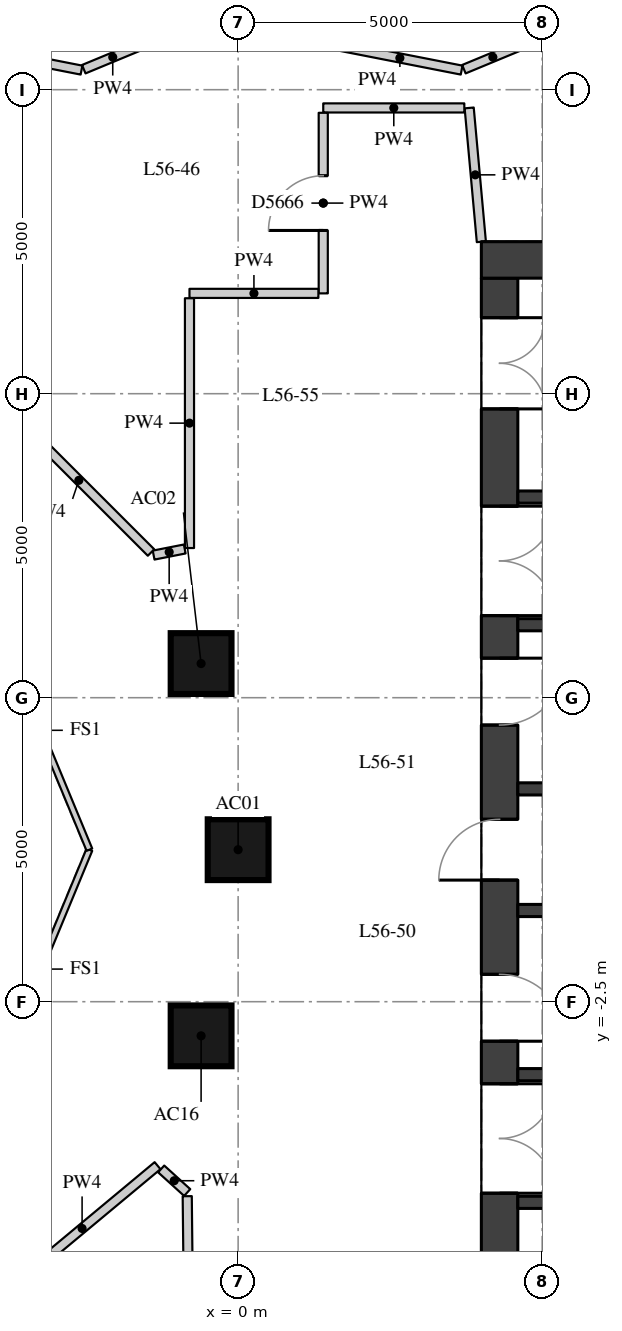
"""IFC4 building model, lengths in metres.
Left out: names, types, materials, properties, quantities, classifications, styles, units other than length and angle.
Written with IfcOpenShell. Run it as: python <this file> out.ifc"""

import sys

from ifc_helpers import new_model, si_unit, direction, frame, frame_2d, origin, origin_2d, place, context, subcontext, project, spatial, rectangle, extrude, element, fill, save


model = new_model("IFC4")
c1 = context("Model", 3, precision=1e-05, world=origin(), true_north=direction((0.0, 1.0)))
c2 = subcontext(c1, "Body", "Model", "MODEL_VIEW")
j1 = project(units=[si_unit("LENGTHUNIT", "METRE"), si_unit("PLANEANGLEUNIT", "RADIAN")], contexts=[c1])
p1 = place(None, origin())
s1 = spatial("IfcSite", under=j1, at=p1, CompositionType="ELEMENT")
p2 = place(p1, origin())
s2 = spatial("IfcBuilding", under=s1, at=p2, CompositionType="ELEMENT")
p3 = place(p2, frame((0.0, 0.0, 199.1)))
s3 = spatial("IfcBuildingStorey", under=s2, at=p3, CompositionType="ELEMENT", Elevation=199.1)
for number, where, z_axis, x_axis in (
    (1, (0.0, 0.0, 0.0), (0.0, 0.0, 1.0), (1.0, 0.0, 0.0)),
    (2, (-0.609, 3.062, 0.0), (0.0, 0.0, 1.0), (1.0, 0.0, 0.0)),
    (3, (-0.609, -3.062, 0.0), (0.0, 0.0, 1.0), (1.0, 0.0, 0.0)),
):
    element("IfcColumn", number, at=place(p3, frame(where, z_axis=z_axis, x_axis=x_axis)), inside=s3, PredefinedType="COLUMN", context=c2, shape_type="SweptSolid", body=[
        extrude(rectangle(XDim=1.0, YDim=1.0, at=origin_2d()), origin(), (0.0, 0.0, 1.0), 3.3),
    ])
p4 = place(p3, frame((4.3, -9.4, 0.0), z_axis=(0.0, 0.0, 1.0), x_axis=(0.0, 1.0, 0.0)))
e4 = element("IfcWall", 4, at=p4, inside=s3, PredefinedType="SHEAR", context=c2, shape_type="SweptSolid", body=[
    extrude(rectangle(XDim=18.8, YDim=0.6, at=frame_2d((9.4, 0.0))), origin(), (0.0, 0.0, 1.0), 3.02),
])
p5 = place(p4, frame((0.65, 0.0, 0.0)))
e5 = element("IfcOpeningElement", 5, at=p5, cuts=e4, PredefinedType="OPENING", context=c2, shape_type="SweptSolid", body=[
    extrude(rectangle(XDim=1.5, YDim=2.1, at=frame_2d((0.75, 1.05))), frame((0.0, 0.31, 0.0), z_axis=(0.0, -1.0, 0.0), x_axis=(1.0, 0.0, 0.0)), (0.0, 0.0, 1.0), 0.62),
])
p6 = place(p4, frame((3.75, 0.0, 0.0)))
e6 = element("IfcOpeningElement", 6, at=p6, cuts=e4, PredefinedType="OPENING", context=c2, shape_type="SweptSolid", body=[
    extrude(rectangle(XDim=1.8, YDim=2.1, at=frame_2d((0.9, 1.05))), frame((0.0, 0.31, 0.0), z_axis=(0.0, -1.0, 0.0), x_axis=(1.0, 0.0, 0.0)), (0.0, 0.0, 1.0), 0.62),
])
p7 = place(p4, frame((6.25, 0.0, 0.0)))
e7 = element("IfcOpeningElement", 7, at=p7, cuts=e4, PredefinedType="OPENING", context=c2, shape_type="SweptSolid", body=[
    extrude(rectangle(XDim=1.1, YDim=2.1, at=frame_2d((0.55, 1.05))), frame((0.0, 0.31, 0.0), z_axis=(0.0, -1.0, 0.0), x_axis=(1.0, 0.0, 0.0)), (0.0, 0.0, 1.0), 0.62),
])
p8 = place(p4, frame((8.9, 0.0, 0.0)))
e8 = element("IfcOpeningElement", 8, at=p8, cuts=e4, PredefinedType="OPENING", context=c2, shape_type="SweptSolid", body=[
    extrude(rectangle(XDim=1.0, YDim=2.1, at=frame_2d((0.5, 1.05))), frame((0.0, 0.31, 0.0), z_axis=(0.0, -1.0, 0.0), x_axis=(1.0, 0.0, 0.0)), (0.0, 0.0, 1.0), 0.62),
])
p9 = place(p4, frame((11.45, 0.0, 0.0)))
e9 = element("IfcOpeningElement", 9, at=p9, cuts=e4, PredefinedType="OPENING", context=c2, shape_type="SweptSolid", body=[
    extrude(rectangle(XDim=1.1, YDim=2.1, at=frame_2d((0.55, 1.05))), frame((0.0, 0.31, 0.0), z_axis=(0.0, -1.0, 0.0), x_axis=(1.0, 0.0, 0.0)), (0.0, 0.0, 1.0), 0.62),
])
p10 = place(p4, frame((13.25, 0.0, 0.0)))
e10 = element("IfcOpeningElement", 10, at=p10, cuts=e4, PredefinedType="OPENING", context=c2, shape_type="SweptSolid", body=[
    extrude(rectangle(XDim=1.8, YDim=2.1, at=frame_2d((0.9, 1.05))), frame((0.0, 0.31, 0.0), z_axis=(0.0, -1.0, 0.0), x_axis=(1.0, 0.0, 0.0)), (0.0, 0.0, 1.0), 0.62),
])
p11 = place(p4, frame((16.65, 0.0, 0.0)))
e11 = element("IfcOpeningElement", 11, at=p11, cuts=e4, PredefinedType="OPENING", context=c2, shape_type="SweptSolid", body=[
    extrude(rectangle(XDim=1.5, YDim=2.1, at=frame_2d((0.75, 1.05))), frame((0.0, 0.31, 0.0), z_axis=(0.0, -1.0, 0.0), x_axis=(1.0, 0.0, 0.0)), (0.0, 0.0, 1.0), 0.62),
])
p12 = place(p3, frame((4.0, 9.7, 0.0), z_axis=(0.0, 0.0, 1.0), x_axis=(1.0, 0.0, 0.0)))
e12 = element("IfcWall", 12, at=p12, inside=s3, PredefinedType="SHEAR", context=c2, shape_type="SweptSolid", body=[
    extrude(rectangle(XDim=12.0, YDim=0.6, at=frame_2d((6.0, 0.0))), origin(), (0.0, 0.0, 1.0), 3.02),
])
p13 = place(p3, frame((4.6, 5.8, 0.0), z_axis=(0.0, 0.0, 1.0), x_axis=(1.0, 0.0, 0.0)))
e13 = element("IfcWall", 13, at=p13, inside=s3, PredefinedType="SHEAR", context=c2, shape_type="SweptSolid", body=[
    extrude(rectangle(XDim=10.8, YDim=0.2, at=frame_2d((5.4, 0.0))), origin(), (0.0, 0.0, 1.0), 3.02),
])
p14 = place(p13, frame((7.05, 0.0, 0.0)))
e14 = element("IfcOpeningElement", 14, at=p14, cuts=e13, PredefinedType="OPENING", context=c2, shape_type="SweptSolid", body=[
    extrude(rectangle(XDim=1.1, YDim=2.1, at=frame_2d((0.55, 1.05))), frame((0.0, 0.11, 0.0), z_axis=(0.0, -1.0, 0.0), x_axis=(1.0, 0.0, 0.0)), (0.0, 0.0, 1.0), 0.22),
])
p15 = place(p13, frame((9.05, 0.0, 0.0)))
e15 = element("IfcOpeningElement", 15, at=p15, cuts=e13, PredefinedType="OPENING", context=c2, shape_type="SweptSolid", body=[
    extrude(rectangle(XDim=1.1, YDim=2.1, at=frame_2d((0.55, 1.05))), frame((0.0, 0.11, 0.0), z_axis=(0.0, -1.0, 0.0), x_axis=(1.0, 0.0, 0.0)), (0.0, 0.0, 1.0), 0.22),
])
p16 = place(p3, frame((4.6, 3.7, 0.0), z_axis=(0.0, 0.0, 1.0), x_axis=(1.0, 0.0, 0.0)))
e16 = element("IfcWall", 16, at=p16, inside=s3, PredefinedType="SHEAR", context=c2, shape_type="SweptSolid", body=[
    extrude(rectangle(XDim=10.8, YDim=0.2, at=frame_2d((5.4, 0.0))), origin(), (0.0, 0.0, 1.0), 3.02),
])
p17 = place(p16, frame((6.6, 0.0, 0.0)))
e17 = element("IfcOpeningElement", 17, at=p17, cuts=e16, PredefinedType="OPENING", context=c2, shape_type="SweptSolid", body=[
    extrude(rectangle(XDim=1.1, YDim=2.1, at=frame_2d((0.55, 1.05))), frame((0.0, 0.11, 0.0), z_axis=(0.0, -1.0, 0.0), x_axis=(1.0, 0.0, 0.0)), (0.0, 0.0, 1.0), 0.22),
])
p18 = place(p16, frame((8.9, 0.0, 0.0)))
e18 = element("IfcOpeningElement", 18, at=p18, cuts=e16, PredefinedType="OPENING", context=c2, shape_type="SweptSolid", body=[
    extrude(rectangle(XDim=1.1, YDim=2.1, at=frame_2d((0.55, 1.05))), frame((0.0, 0.11, 0.0), z_axis=(0.0, -1.0, 0.0), x_axis=(1.0, 0.0, 0.0)), (0.0, 0.0, 1.0), 0.22),
])
for number, where, z_axis, x_axis in (
    (19, (4.6, 1.0, 0.0), (0.0, 0.0, 1.0), (1.0, 0.0, 0.0)),
    (20, (4.6, -1.0, 0.0), (0.0, 0.0, 1.0), (1.0, 0.0, 0.0)),
):
    element("IfcWall", number, at=place(p3, frame(where, z_axis=z_axis, x_axis=x_axis)), inside=s3, PredefinedType="SHEAR", context=c2, shape_type="SweptSolid", body=[
        extrude(rectangle(XDim=10.8, YDim=0.2, at=frame_2d((5.4, 0.0))), origin(), (0.0, 0.0, 1.0), 3.02),
    ])
p19 = place(p3, frame((4.6, -3.7, 0.0), z_axis=(0.0, 0.0, 1.0), x_axis=(1.0, 0.0, 0.0)))
e21 = element("IfcWall", 21, at=p19, inside=s3, PredefinedType="SHEAR", context=c2, shape_type="SweptSolid", body=[
    extrude(rectangle(XDim=10.8, YDim=0.2, at=frame_2d((5.4, 0.0))), origin(), (0.0, 0.0, 1.0), 3.02),
])
p20 = place(p19, frame((6.6, 0.0, 0.0)))
e22 = element("IfcOpeningElement", 22, at=p20, cuts=e21, PredefinedType="OPENING", context=c2, shape_type="SweptSolid", body=[
    extrude(rectangle(XDim=1.1, YDim=2.1, at=frame_2d((0.55, 1.05))), frame((0.0, 0.11, 0.0), z_axis=(0.0, -1.0, 0.0), x_axis=(1.0, 0.0, 0.0)), (0.0, 0.0, 1.0), 0.22),
])
p21 = place(p19, frame((8.9, 0.0, 0.0)))
e23 = element("IfcOpeningElement", 23, at=p21, cuts=e21, PredefinedType="OPENING", context=c2, shape_type="SweptSolid", body=[
    extrude(rectangle(XDim=1.1, YDim=2.1, at=frame_2d((0.55, 1.05))), frame((0.0, 0.11, 0.0), z_axis=(0.0, -1.0, 0.0), x_axis=(1.0, 0.0, 0.0)), (0.0, 0.0, 1.0), 0.22),
])
p22 = place(p3, frame((4.6, -5.8, 0.0), z_axis=(0.0, 0.0, 1.0), x_axis=(1.0, 0.0, 0.0)))
e24 = element("IfcWall", 24, at=p22, inside=s3, PredefinedType="SHEAR", context=c2, shape_type="SweptSolid", body=[
    extrude(rectangle(XDim=10.8, YDim=0.2, at=frame_2d((5.4, 0.0))), origin(), (0.0, 0.0, 1.0), 3.02),
])
p23 = place(p3, frame((4.052, 16.323, 0.0), z_axis=(0.0, 0.0, 1.0), x_axis=(0.922513794011, -0.385964117322, 0.0)))
e25 = element("IfcWall", 25, at=p23, inside=s3, PredefinedType="PARTITIONING", context=c2, shape_type="SweptSolid", body=[
    extrude(rectangle(XDim=9.47, YDim=0.2, at=frame_2d((4.735, 0.0))), origin(), (0.0, 0.0, 1.0), 3.02),
])
p24 = place(p23, frame((8.186, 0.0, 0.0)))
e26 = element("IfcOpeningElement", 26, at=p24, cuts=e25, PredefinedType="OPENING", context=c2, shape_type="SweptSolid", body=[
    extrude(rectangle(XDim=0.9, YDim=2.1, at=frame_2d((0.45, 1.05))), frame((0.0, 0.11, 0.0), z_axis=(0.0, -1.0, 0.0), x_axis=(1.0, 0.0, 0.0)), (0.0, 0.0, 1.0), 0.22),
])
p25 = place(p23, frame((2.639, 0.0, 0.0)))
e27 = element("IfcOpeningElement", 27, at=p25, cuts=e25, PredefinedType="OPENING", context=c2, shape_type="SweptSolid", body=[
    extrude(rectangle(XDim=1.1, YDim=2.1, at=frame_2d((0.55, 1.05))), frame((0.0, 0.11, 0.0), z_axis=(0.0, -1.0, 0.0), x_axis=(1.0, 0.0, 0.0)), (0.0, 0.0, 1.0), 0.22),
])
p26 = place(p3, frame((4.0, 9.999, 0.0), z_axis=(0.0, 0.0, 1.0), x_axis=(-0.090475982725, 0.995898637689, 0.0)))
e28 = element("IfcWall", 28, at=p26, inside=s3, PredefinedType="PARTITIONING", context=c2, shape_type="SweptSolid", body=[
    extrude(rectangle(XDim=2.21, YDim=0.15, at=frame_2d((1.105, 0.0))), origin(), (0.0, 0.0, 1.0), 3.02),
])
p27 = place(p3, frame((3.72, 12.2, 0.0), z_axis=(0.0, 0.0, 1.0), x_axis=(-1.0, 0.0, 0.0)))
e29 = element("IfcWall", 29, at=p27, inside=s3, PredefinedType="PARTITIONING", context=c2, shape_type="SweptSolid", body=[
    extrude(rectangle(XDim=2.32, YDim=0.15, at=frame_2d((1.16, 0.0))), origin(), (0.0, 0.0, 1.0), 3.02),
])
p28 = place(p3, frame((1.4, 12.12, 0.0), z_axis=(0.0, 0.0, 1.0), x_axis=(0.0, -1.0, 0.0)))
e30 = element("IfcWall", 30, at=p28, inside=s3, PredefinedType="PARTITIONING", context=c2, shape_type="SweptSolid", body=[
    extrude(rectangle(XDim=2.97, YDim=0.15, at=frame_2d((1.485, 0.0))), origin(), (0.0, 0.0, 1.0), 3.02),
])
p29 = place(p28, frame((1.035, 0.0, 0.0)))
e31 = element("IfcOpeningElement", 31, at=p29, cuts=e30, PredefinedType="OPENING", context=c2, shape_type="SweptSolid", body=[
    extrude(rectangle(XDim=0.9, YDim=2.1, at=frame_2d((0.45, 1.05))), frame((0.0, 0.085, 0.0), z_axis=(0.0, -1.0, 0.0), x_axis=(1.0, 0.0, 0.0)), (0.0, 0.0, 1.0), 0.17),
])
p30 = place(p3, frame((1.32, 9.15, 0.0), z_axis=(0.0, 0.0, 1.0), x_axis=(-1.0, 0.0, 0.0)))
e32 = element("IfcWall", 32, at=p30, inside=s3, PredefinedType="PARTITIONING", context=c2, shape_type="SweptSolid", body=[
    extrude(rectangle(XDim=2.12, YDim=0.15, at=frame_2d((1.06, 0.0))), origin(), (0.0, 0.0, 1.0), 3.02),
])
p31 = place(p3, frame((-0.8, 9.07, 0.0), z_axis=(0.0, 0.0, 1.0), x_axis=(0.0, -1.0, 0.0)))
e33 = element("IfcWall", 33, at=p31, inside=s3, PredefinedType="PARTITIONING", context=c2, shape_type="SweptSolid", body=[
    extrude(rectangle(XDim=4.108, YDim=0.15, at=frame_2d((2.054, 0.0))), origin(), (0.0, 0.0, 1.0), 3.02),
])
p32 = place(p3, frame((-0.878, 4.946, 0.0), z_axis=(0.0, 0.0, 1.0), x_axis=(-0.981223514921, -0.192874087857, 0.0)))
e34 = element("IfcWall", 34, at=p32, inside=s3, PredefinedType="PARTITIONING", context=c2, shape_type="SweptSolid", body=[
    extrude(rectangle(XDim=0.521, YDim=0.15, at=frame_2d((0.261, 0.0))), origin(), (0.0, 0.0, 1.0), 3.02),
])
p33 = place(p3, frame((-1.432, 4.888, 0.0), z_axis=(0.0, 0.0, 1.0), x_axis=(-0.70714312975, 0.707070430754, 0.0)))
e35 = element("IfcWall", 35, at=p33, inside=s3, PredefinedType="PARTITIONING", context=c2, shape_type="SweptSolid", body=[
    extrude(rectangle(XDim=3.358, YDim=0.15, at=frame_2d((1.679, 0.0))), origin(), (0.0, 0.0, 1.0), 3.02),
])
p34 = place(p3, frame((-4.607, 13.22, 0.0), z_axis=(0.0, 0.0, 1.0), x_axis=(0.981304142817, -0.192463449234, 0.0)))
e36 = element("IfcWall", 36, at=p34, inside=s3, PredefinedType="PARTITIONING", context=c2, shape_type="SweptSolid", body=[
    extrude(rectangle(XDim=2.07, YDim=0.15, at=frame_2d((1.035, 0.0))), origin(), (0.0, 0.0, 1.0), 3.02),
])
p35 = place(p3, frame((-2.539, 12.837, 0.0), z_axis=(0.0, 0.0, 1.0), x_axis=(0.923768662954, 0.382950985565, 0.0)))
e37 = element("IfcWall", 37, at=p35, inside=s3, PredefinedType="PARTITIONING", context=c2, shape_type="SweptSolid", body=[
    extrude(rectangle(XDim=1.031, YDim=0.15, at=frame_2d((0.516, 0.0))), origin(), (0.0, 0.0, 1.0), 3.02),
])
p36 = place(p3, frame((1.644, 13.22, 0.0), z_axis=(0.0, 0.0, 1.0), x_axis=(0.981304142817, -0.192463449234, 0.0)))
e38 = element("IfcWall", 38, at=p36, inside=s3, PredefinedType="PARTITIONING", context=c2, shape_type="SweptSolid", body=[
    extrude(rectangle(XDim=2.07, YDim=0.15, at=frame_2d((1.035, 0.0))), origin(), (0.0, 0.0, 1.0), 3.02),
])
p37 = place(p3, frame((3.713, 12.837, 0.0), z_axis=(0.0, 0.0, 1.0), x_axis=(0.923768662954, 0.382950985565, 0.0)))
e39 = element("IfcWall", 39, at=p37, inside=s3, PredefinedType="PARTITIONING", context=c2, shape_type="SweptSolid", body=[
    extrude(rectangle(XDim=1.031, YDim=0.15, at=frame_2d((0.516, 0.0))), origin(), (0.0, 0.0, 1.0), 3.02),
])
p38 = place(p3, frame((-3.807, -7.262, 0.0), z_axis=(0.0, 0.0, 1.0), x_axis=(0.768654933145, 0.639663656739, 0.0)))
e40 = element("IfcWall", 40, at=p38, inside=s3, PredefinedType="PARTITIONING", context=c2, shape_type="SweptSolid", body=[
    extrude(rectangle(XDim=3.229, YDim=0.15, at=frame_2d((1.615, 0.0))), origin(), (0.0, 0.0, 1.0), 3.02),
])
p39 = place(p3, frame((-1.266, -5.25, 0.0), z_axis=(0.0, 0.0, 1.0), x_axis=(0.740704364941, -0.671831112525, 0.0)))
e41 = element("IfcWall", 41, at=p39, inside=s3, PredefinedType="PARTITIONING", context=c2, shape_type="SweptSolid", body=[
    extrude(rectangle(XDim=0.578, YDim=0.15, at=frame_2d((0.289, 0.0))), origin(), (0.0, 0.0, 1.0), 3.02),
])
p40 = place(p3, frame((-0.837, -5.699, 0.0), z_axis=(0.0, 0.0, 1.0), x_axis=(0.010681337428, -0.999942952888, 0.0)))
e42 = element("IfcWall", 42, at=p40, inside=s3, PredefinedType="PARTITIONING", context=c2, shape_type="SweptSolid", body=[
    extrude(rectangle(XDim=3.451, YDim=0.15, at=frame_2d((1.726, 0.0))), origin(), (0.0, 0.0, 1.0), 3.02),
])
for number, where, z_axis, x_axis in (
    (43, (-2.446, 0.0, 0.0), (0.0, 0.0, 1.0), (-0.383, -0.924, 0.0)),
    (44, (-4.073, 3.927, 0.0), (0.0, 0.0, 1.0), (0.383, -0.924, 0.0)),
):
    element("IfcWall", number, at=place(p3, frame(where, z_axis=z_axis, x_axis=x_axis)), inside=s3, PredefinedType="PARTITIONING", context=c2, shape_type="SweptSolid", body=[
        extrude(rectangle(XDim=4.251, YDim=0.1, at=frame_2d((2.125, 0.0))), origin(), (0.0, 0.0, 1.0), 3.02),
    ])
p41 = place(p6, origin())
e45 = element("IfcDoor", 45, at=p41, inside=s3, OperationType="DOUBLE_DOOR_SINGLE_SWING", PredefinedType="DOOR", context=c2, shape_type="SweptSolid", body=[
    extrude(rectangle(XDim=1.8, YDim=2.1, at=frame_2d((0.9, 1.05))), frame((0.0, 0.025, 0.0), z_axis=(0.0, -1.0, 0.0), x_axis=(1.0, 0.0, 0.0)), (0.0, 0.0, 1.0), 0.05),
])
fill(e6, e45)
p42 = place(p7, origin())
e46 = element("IfcDoor", 46, at=p42, inside=s3, OperationType="SINGLE_SWING_RIGHT", PredefinedType="DOOR", context=c2, shape_type="SweptSolid", body=[
    extrude(rectangle(XDim=1.1, YDim=2.1, at=frame_2d((0.55, 1.05))), frame((0.0, 0.025, 0.0), z_axis=(0.0, -1.0, 0.0), x_axis=(1.0, 0.0, 0.0)), (0.0, 0.0, 1.0), 0.05),
])
fill(e7, e46)
p43 = place(p8, origin())
e47 = element("IfcDoor", 47, at=p43, inside=s3, OperationType="SINGLE_SWING_LEFT", PredefinedType="DOOR", context=c2, shape_type="SweptSolid", body=[
    extrude(rectangle(XDim=1.0, YDim=2.1, at=frame_2d((0.5, 1.05))), frame((0.0, 0.025, 0.0), z_axis=(0.0, -1.0, 0.0), x_axis=(1.0, 0.0, 0.0)), (0.0, 0.0, 1.0), 0.05),
])
fill(e8, e47)
p44 = place(p9, origin())
e48 = element("IfcDoor", 48, at=p44, inside=s3, OperationType="SINGLE_SWING_LEFT", PredefinedType="DOOR", context=c2, shape_type="SweptSolid", body=[
    extrude(rectangle(XDim=1.1, YDim=2.1, at=frame_2d((0.55, 1.05))), frame((0.0, 0.025, 0.0), z_axis=(0.0, -1.0, 0.0), x_axis=(1.0, 0.0, 0.0)), (0.0, 0.0, 1.0), 0.05),
])
fill(e9, e48)
p45 = place(p10, origin())
e49 = element("IfcDoor", 49, at=p45, inside=s3, OperationType="DOUBLE_DOOR_SINGLE_SWING", PredefinedType="DOOR", context=c2, shape_type="SweptSolid", body=[
    extrude(rectangle(XDim=1.8, YDim=2.1, at=frame_2d((0.9, 1.05))), frame((0.0, 0.025, 0.0), z_axis=(0.0, -1.0, 0.0), x_axis=(1.0, 0.0, 0.0)), (0.0, 0.0, 1.0), 0.05),
])
fill(e10, e49)
p46 = place(p11, origin())
e50 = element("IfcDoor", 50, at=p46, inside=s3, OperationType="DOUBLE_DOOR_SINGLE_SWING", PredefinedType="DOOR", context=c2, shape_type="SweptSolid", body=[
    extrude(rectangle(XDim=1.5, YDim=2.1, at=frame_2d((0.75, 1.05))), frame((0.0, 0.025, 0.0), z_axis=(0.0, -1.0, 0.0), x_axis=(1.0, 0.0, 0.0)), (0.0, 0.0, 1.0), 0.05),
])
fill(e11, e50)
p47 = place(p29, origin())
e51 = element("IfcDoor", 51, at=p47, inside=s3, OperationType="SINGLE_SWING_LEFT", PredefinedType="DOOR", context=c2, shape_type="SweptSolid", body=[
    extrude(rectangle(XDim=0.9, YDim=2.1, at=frame_2d((0.45, 1.05))), frame((0.0, 0.025, 0.0), z_axis=(0.0, -1.0, 0.0), x_axis=(1.0, 0.0, 0.0)), (0.0, 0.0, 1.0), 0.05),
])
fill(e31, e51)
save(model, sys.argv[1])
